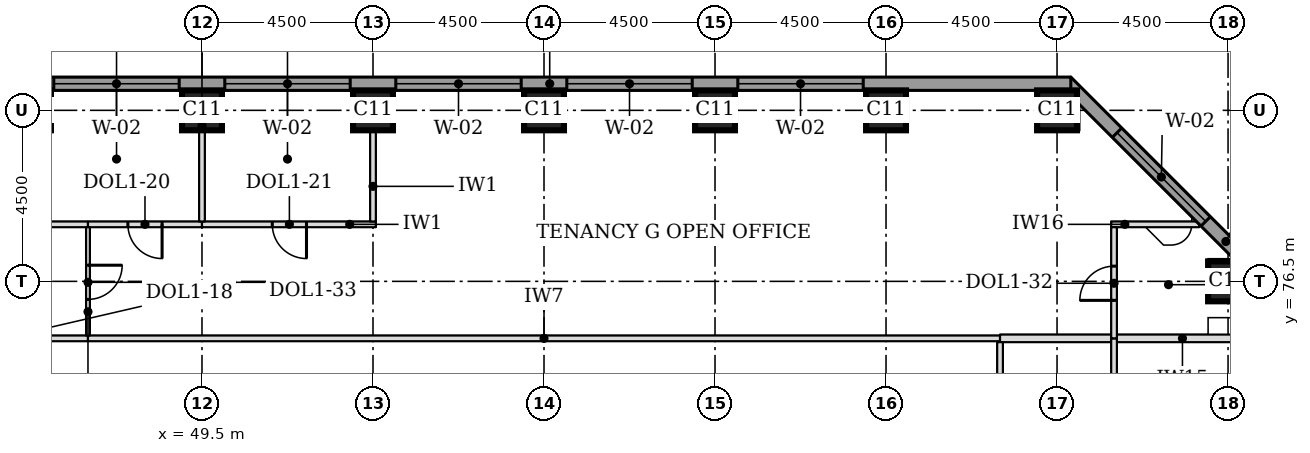
"""IFC4 building model, lengths in metres.
Left out: names, types, materials, properties, quantities, classifications, styles, units other than length and angle.
Written with IfcOpenShell. Run it as: python <this file> out.ifc"""

import sys

from ifc_helpers import new_model, si_unit, direction, frame, frame_2d, origin, origin_2d, place, context, subcontext, project, spatial, rectangle, extrude, element, fill, save


model = new_model("IFC4")
c1 = context("Model", 3, precision=1e-05, world=origin(), true_north=direction((0.0, 1.0)))
c2 = subcontext(c1, "Body", "Model", "MODEL_VIEW")
j1 = project(units=[si_unit("LENGTHUNIT", "METRE"), si_unit("PLANEANGLEUNIT", "RADIAN")], contexts=[c1])
p1 = place(None, origin())
s1 = spatial("IfcSite", under=j1, at=p1, CompositionType="ELEMENT")
p2 = place(p1, origin())
s2 = spatial("IfcBuilding", under=s1, at=p2, CompositionType="ELEMENT")
p3 = place(p2, frame((0.0, 0.0, 82.6)))
s3 = spatial("IfcBuildingStorey", under=s2, at=p3, CompositionType="ELEMENT", Elevation=82.6)
for number, where, z_axis, x_axis in (
    (1, (76.5, 76.5, 0.0), (0.0, 0.0, 1.0), (1.0, 0.0, 0.0)),
    (2, (49.5, 81.0, 0.0), (0.0, 0.0, 1.0), (1.0, 0.0, 0.0)),
    (3, (54.0, 81.0, 0.0), (0.0, 0.0, 1.0), (1.0, 0.0, 0.0)),
    (4, (58.5, 81.0, 0.0), (0.0, 0.0, 1.0), (1.0, 0.0, 0.0)),
    (5, (63.0, 81.0, 0.0), (0.0, 0.0, 1.0), (1.0, 0.0, 0.0)),
    (6, (67.5, 81.0, 0.0), (0.0, 0.0, 1.0), (1.0, 0.0, 0.0)),
    (7, (72.0, 81.0, 0.0), (0.0, 0.0, 1.0), (1.0, 0.0, 0.0)),
):
    element("IfcColumn", number, at=place(p3, frame(where, z_axis=z_axis, x_axis=x_axis)), inside=s3, PredefinedType="COLUMN", context=c2, shape_type="SweptSolid", body=[
        extrude(rectangle(XDim=1.05, YDim=1.05, at=origin_2d()), origin(), (0.0, 0.0, 1.0), 3.7),
    ])
p4 = place(p3, frame((77.251, 76.739, 0.0), z_axis=(0.0, 0.0, 1.0), x_axis=(-0.707106781187, 0.707106781187, 0.0)))
e8 = element("IfcWall", 8, at=p4, inside=s3, PredefinedType="STANDARD", context=c2, shape_type="SweptSolid", body=[
    extrude(rectangle(XDim=7.089, YDim=0.35, at=frame_2d((3.544, 0.0))), origin(), (0.0, 0.0, 1.0), 3.525),
])
p5 = place(p4, frame((1.894, 0.0, 0.9)))
e9 = element("IfcOpeningElement", 9, at=p5, cuts=e8, PredefinedType="OPENING", context=c2, shape_type="SweptSolid", body=[
    extrude(rectangle(XDim=3.3, YDim=1.9, at=frame_2d((1.65, 0.95))), frame((0.0, 0.185, 0.0), z_axis=(0.0, -1.0, 0.0), x_axis=(1.0, 0.0, 0.0)), (0.0, 0.0, 1.0), 0.37),
])
p6 = place(p3, frame((72.362, 81.7, 0.0), z_axis=(0.0, 0.0, 1.0), x_axis=(-1.0, 0.0, 0.0)))
e10 = element("IfcWall", 10, at=p6, inside=s3, PredefinedType="STANDARD", context=c2, shape_type="SweptSolid", body=[
    extrude(rectangle(XDim=32.225, YDim=0.35, at=frame_2d((16.112, 0.0))), origin(), (0.0, 0.0, 1.0), 3.525),
])
p7 = place(p6, frame((5.462, 0.0, 0.9)))
e11 = element("IfcOpeningElement", 11, at=p7, cuts=e10, PredefinedType="OPENING", context=c2, shape_type="SweptSolid", body=[
    extrude(rectangle(XDim=3.3, YDim=1.9, at=frame_2d((1.65, 0.95))), frame((0.0, 0.185, 0.0), z_axis=(0.0, -1.0, 0.0), x_axis=(1.0, 0.0, 0.0)), (0.0, 0.0, 1.0), 0.37),
])
p8 = place(p6, frame((9.962, 0.0, 0.9)))
e12 = element("IfcOpeningElement", 12, at=p8, cuts=e10, PredefinedType="OPENING", context=c2, shape_type="SweptSolid", body=[
    extrude(rectangle(XDim=3.3, YDim=1.9, at=frame_2d((1.65, 0.95))), frame((0.0, 0.185, 0.0), z_axis=(0.0, -1.0, 0.0), x_axis=(1.0, 0.0, 0.0)), (0.0, 0.0, 1.0), 0.37),
])
p9 = place(p6, frame((14.462, 0.0, 0.9)))
e13 = element("IfcOpeningElement", 13, at=p9, cuts=e10, PredefinedType="OPENING", context=c2, shape_type="SweptSolid", body=[
    extrude(rectangle(XDim=3.3, YDim=1.9, at=frame_2d((1.65, 0.95))), frame((0.0, 0.185, 0.0), z_axis=(0.0, -1.0, 0.0), x_axis=(1.0, 0.0, 0.0)), (0.0, 0.0, 1.0), 0.37),
])
p10 = place(p6, frame((18.962, 0.0, 0.9)))
e14 = element("IfcOpeningElement", 14, at=p10, cuts=e10, PredefinedType="OPENING", context=c2, shape_type="SweptSolid", body=[
    extrude(rectangle(XDim=3.3, YDim=1.9, at=frame_2d((1.65, 0.95))), frame((0.0, 0.185, 0.0), z_axis=(0.0, -1.0, 0.0), x_axis=(1.0, 0.0, 0.0)), (0.0, 0.0, 1.0), 0.37),
])
p11 = place(p6, frame((23.462, 0.0, 0.9)))
e15 = element("IfcOpeningElement", 15, at=p11, cuts=e10, PredefinedType="OPENING", context=c2, shape_type="SweptSolid", body=[
    extrude(rectangle(XDim=3.3, YDim=1.9, at=frame_2d((1.65, 0.95))), frame((0.0, 0.185, 0.0), z_axis=(0.0, -1.0, 0.0), x_axis=(1.0, 0.0, 0.0)), (0.0, 0.0, 1.0), 0.37),
])
p12 = place(p3, frame((42.0, 75.0, 0.0), z_axis=(0.0, 0.0, 1.0), x_axis=(1.0, 0.0, 0.0)))
e16 = element("IfcWall", 16, at=p12, inside=s3, PredefinedType="PARTITIONING", context=c2, shape_type="SweptSolid", body=[
    extrude(rectangle(XDim=4.5, YDim=0.15, at=frame_2d((2.25, 0.0))), origin(), (0.0, 0.0, 1.0), 3.55),
])
p13 = place(p12, frame((1.75, 0.0, 0.0)))
e17 = element("IfcOpeningElement", 17, at=p13, cuts=e16, PredefinedType="OPENING", context=c2, shape_type="SweptSolid", body=[
    extrude(rectangle(XDim=1.0, YDim=2.1, at=frame_2d((0.5, 1.05))), frame((0.0, 0.085, 0.0), z_axis=(0.0, -1.0, 0.0), x_axis=(1.0, 0.0, 0.0)), (0.0, 0.0, 1.0), 0.17),
])
p14 = place(p3, frame((46.5, 75.0, 0.0), z_axis=(0.0, 0.0, 1.0), x_axis=(1.0, 0.0, 0.0)))
e18 = element("IfcWall", 18, at=p14, inside=s3, PredefinedType="PARTITIONING", context=c2, shape_type="SweptSolid", body=[
    extrude(rectangle(XDim=24.0, YDim=0.15, at=frame_2d((12.0, 0.0))), origin(), (0.0, 0.0, 1.0), 3.55),
])
p15 = place(p3, frame((70.5, 75.0, 0.0), z_axis=(0.0, 0.0, 1.0), x_axis=(1.0, 0.0, 0.0)))
e19 = element("IfcWall", 19, at=p15, inside=s3, PredefinedType="PARTITIONING", context=c2, shape_type="SweptSolid", body=[
    extrude(rectangle(XDim=2.925, YDim=0.2, at=frame_2d((1.462, 0.0))), origin(), (0.0, 0.0, 1.0), 3.55),
])
p16 = place(p3, frame((73.575, 75.0, 0.0), z_axis=(0.0, 0.0, 1.0), x_axis=(1.0, 0.0, 0.0)))
e20 = element("IfcWall", 20, at=p16, inside=s3, PredefinedType="PARTITIONING", context=c2, shape_type="SweptSolid", body=[
    extrude(rectangle(XDim=3.45, YDim=0.2, at=frame_2d((1.725, 0.0))), origin(), (0.0, 0.0, 1.0), 3.55),
])
p17 = place(p3, frame((45.0, 78.0, 0.0), z_axis=(0.0, 0.0, 1.0), x_axis=(1.0, 0.0, 0.0)))
e21 = element("IfcWall", 21, at=p17, inside=s3, PredefinedType="PARTITIONING", context=c2, shape_type="SweptSolid", body=[
    extrude(rectangle(XDim=1.5, YDim=0.15, at=frame_2d((0.75, 0.0))), origin(), (0.0, 0.0, 1.0), 3.55),
])
p18 = place(p3, frame((46.5, 78.0, 0.0), z_axis=(0.0, 0.0, 1.0), x_axis=(1.0, 0.0, 0.0)))
e22 = element("IfcWall", 22, at=p18, inside=s3, PredefinedType="PARTITIONING", context=c2, shape_type="SweptSolid", body=[
    extrude(rectangle(XDim=3.0, YDim=0.15, at=frame_2d((1.5, 0.0))), origin(), (0.0, 0.0, 1.0), 3.55),
])
p19 = place(p18, frame((1.05, 0.0, 0.0)))
e23 = element("IfcOpeningElement", 23, at=p19, cuts=e22, PredefinedType="OPENING", context=c2, shape_type="SweptSolid", body=[
    extrude(rectangle(XDim=0.9, YDim=2.1, at=frame_2d((0.45, 1.05))), frame((0.0, 0.085, 0.0), z_axis=(0.0, -1.0, 0.0), x_axis=(1.0, 0.0, 0.0)), (0.0, 0.0, 1.0), 0.17),
])
p20 = place(p3, frame((49.5, 78.0, 0.0), z_axis=(0.0, 0.0, 1.0), x_axis=(1.0, 0.0, 0.0)))
e24 = element("IfcWall", 24, at=p20, inside=s3, PredefinedType="PARTITIONING", context=c2, shape_type="SweptSolid", body=[
    extrude(rectangle(XDim=4.575, YDim=0.15, at=frame_2d((2.288, 0.0))), origin(), (0.0, 0.0, 1.0), 3.55),
])
p21 = place(p20, frame((1.85, 0.0, 0.0)))
e25 = element("IfcOpeningElement", 25, at=p21, cuts=e24, PredefinedType="OPENING", context=c2, shape_type="SweptSolid", body=[
    extrude(rectangle(XDim=0.9, YDim=2.1, at=frame_2d((0.45, 1.05))), frame((0.0, 0.085, 0.0), z_axis=(0.0, -1.0, 0.0), x_axis=(1.0, 0.0, 0.0)), (0.0, 0.0, 1.0), 0.17),
])
p22 = place(p3, frame((73.425, 78.0, 0.0), z_axis=(0.0, 0.0, 1.0), x_axis=(1.0, 0.0, 0.0)))
e26 = element("IfcWall", 26, at=p22, inside=s3, PredefinedType="PARTITIONING", context=c2, shape_type="SweptSolid", body=[
    extrude(rectangle(XDim=2.317, YDim=0.15, at=frame_2d((1.159, 0.0))), origin(), (0.0, 0.0, 1.0), 3.55),
])
p23 = place(p3, frame((70.5, 72.0, 0.0), z_axis=(0.0, 0.0, 1.0), x_axis=(0.0, 1.0, 0.0)))
e27 = element("IfcWall", 27, at=p23, inside=s3, PredefinedType="PARTITIONING", context=c2, shape_type="SweptSolid", body=[
    extrude(rectangle(XDim=2.9, YDim=0.15, at=frame_2d((1.45, 0.0))), origin(), (0.0, 0.0, 1.0), 3.55),
])
p24 = place(p3, frame((73.5, 72.075, 0.0), z_axis=(0.0, 0.0, 1.0), x_axis=(0.0, 1.0, 0.0)))
e28 = element("IfcWall", 28, at=p24, inside=s3, PredefinedType="PARTITIONING", context=c2, shape_type="SweptSolid", body=[
    extrude(rectangle(XDim=2.925, YDim=0.15, at=frame_2d((1.462, 0.0))), origin(), (0.0, 0.0, 1.0), 3.55),
])
p25 = place(p3, frame((73.5, 75.0, 0.0), z_axis=(0.0, 0.0, 1.0), x_axis=(0.0, 1.0, 0.0)))
e29 = element("IfcWall", 29, at=p25, inside=s3, PredefinedType="PARTITIONING", context=c2, shape_type="SweptSolid", body=[
    extrude(rectangle(XDim=2.925, YDim=0.15, at=frame_2d((1.462, 0.0))), origin(), (0.0, 0.0, 1.0), 3.55),
])
p26 = place(p25, frame((1.0, 0.0, 0.0)))
e30 = element("IfcOpeningElement", 30, at=p26, cuts=e29, PredefinedType="OPENING", context=c2, shape_type="SweptSolid", body=[
    extrude(rectangle(XDim=0.9, YDim=2.1, at=frame_2d((0.45, 1.05))), frame((0.0, 0.085, 0.0), z_axis=(0.0, -1.0, 0.0), x_axis=(1.0, 0.0, 0.0)), (0.0, 0.0, 1.0), 0.17),
])
p27 = place(p3, frame((46.5, 75.075, 0.0), z_axis=(0.0, 0.0, 1.0), x_axis=(0.0, 1.0, 0.0)))
e31 = element("IfcWall", 31, at=p27, inside=s3, PredefinedType="PARTITIONING", context=c2, shape_type="SweptSolid", body=[
    extrude(rectangle(XDim=2.85, YDim=0.1, at=frame_2d((1.425, 0.0))), origin(), (0.0, 0.0, 1.0), 3.022),
])
p28 = place(p27, frame((0.95, 0.0, 0.0)))
e32 = element("IfcOpeningElement", 32, at=p28, cuts=e31, PredefinedType="OPENING", context=c2, shape_type="SweptSolid", body=[
    extrude(rectangle(XDim=0.9, YDim=2.1, at=frame_2d((0.45, 1.05))), frame((0.0, 0.06, 0.0), z_axis=(0.0, -1.0, 0.0), x_axis=(1.0, 0.0, 0.0)), (0.0, 0.0, 1.0), 0.12),
])
for number, where, z_axis, x_axis in (
    (33, (49.5, 78.075, 0.0), (0.0, 0.0, 1.0), (0.0, 1.0, 0.0)),
    (34, (54.0, 78.075, 0.0), (0.0, 0.0, 1.0), (0.0, 1.0, 0.0)),
):
    element("IfcWall", number, at=place(p3, frame(where, z_axis=z_axis, x_axis=x_axis)), inside=s3, PredefinedType="PARTITIONING", context=c2, shape_type="SweptSolid", body=[
        extrude(rectangle(XDim=3.45, YDim=0.15, at=frame_2d((1.725, 0.0))), origin(), (0.0, 0.0, 1.0), 3.55),
    ])
p29 = place(p5, origin())
e35 = element("IfcWindow", 35, at=p29, inside=s3, PartitioningType="SINGLE_PANEL", PredefinedType="WINDOW", context=c2, shape_type="SweptSolid", body=[
    extrude(rectangle(XDim=3.3, YDim=1.9, at=frame_2d((1.65, 0.95))), frame((0.0, 0.085, 0.0), z_axis=(0.0, -1.0, 0.0), x_axis=(1.0, 0.0, 0.0)), (0.0, 0.0, 1.0), 0.06),
])
fill(e9, e35)
p30 = place(p7, origin())
e36 = element("IfcWindow", 36, at=p30, inside=s3, PartitioningType="SINGLE_PANEL", PredefinedType="WINDOW", context=c2, shape_type="SweptSolid", body=[
    extrude(rectangle(XDim=3.3, YDim=1.9, at=frame_2d((1.65, 0.95))), frame((0.0, 0.085, 0.0), z_axis=(0.0, -1.0, 0.0), x_axis=(1.0, 0.0, 0.0)), (0.0, 0.0, 1.0), 0.06),
])
fill(e11, e36)
p31 = place(p8, origin())
e37 = element("IfcWindow", 37, at=p31, inside=s3, PartitioningType="SINGLE_PANEL", PredefinedType="WINDOW", context=c2, shape_type="SweptSolid", body=[
    extrude(rectangle(XDim=3.3, YDim=1.9, at=frame_2d((1.65, 0.95))), frame((0.0, 0.085, 0.0), z_axis=(0.0, -1.0, 0.0), x_axis=(1.0, 0.0, 0.0)), (0.0, 0.0, 1.0), 0.06),
])
fill(e12, e37)
p32 = place(p9, origin())
e38 = element("IfcWindow", 38, at=p32, inside=s3, PartitioningType="SINGLE_PANEL", PredefinedType="WINDOW", context=c2, shape_type="SweptSolid", body=[
    extrude(rectangle(XDim=3.3, YDim=1.9, at=frame_2d((1.65, 0.95))), frame((0.0, 0.085, 0.0), z_axis=(0.0, -1.0, 0.0), x_axis=(1.0, 0.0, 0.0)), (0.0, 0.0, 1.0), 0.06),
])
fill(e13, e38)
p33 = place(p10, origin())
e39 = element("IfcWindow", 39, at=p33, inside=s3, PartitioningType="SINGLE_PANEL", PredefinedType="WINDOW", context=c2, shape_type="SweptSolid", body=[
    extrude(rectangle(XDim=3.3, YDim=1.9, at=frame_2d((1.65, 0.95))), frame((0.0, 0.085, 0.0), z_axis=(0.0, -1.0, 0.0), x_axis=(1.0, 0.0, 0.0)), (0.0, 0.0, 1.0), 0.06),
])
fill(e14, e39)
p34 = place(p11, origin())
e40 = element("IfcWindow", 40, at=p34, inside=s3, PartitioningType="SINGLE_PANEL", PredefinedType="WINDOW", context=c2, shape_type="SweptSolid", body=[
    extrude(rectangle(XDim=3.3, YDim=1.9, at=frame_2d((1.65, 0.95))), frame((0.0, 0.085, 0.0), z_axis=(0.0, -1.0, 0.0), x_axis=(1.0, 0.0, 0.0)), (0.0, 0.0, 1.0), 0.06),
])
fill(e15, e40)
p35 = place(p28, frame((0.9, 0.0, 0.0), z_axis=(0.0, 0.0, 1.0), x_axis=(-1.0, 0.0, 0.0)))
e41 = element("IfcDoor", 41, at=p35, inside=s3, OperationType="SINGLE_SWING_LEFT", PredefinedType="DOOR", context=c2, shape_type="SweptSolid", body=[
    extrude(rectangle(XDim=0.9, YDim=2.1, at=frame_2d((0.45, 1.05))), frame((0.0, 0.025, 0.0), z_axis=(0.0, -1.0, 0.0), x_axis=(1.0, 0.0, 0.0)), (0.0, 0.0, 1.0), 0.05),
])
fill(e32, e41)
p36 = place(p26, origin())
e42 = element("IfcDoor", 42, at=p36, inside=s3, OperationType="SINGLE_SWING_LEFT", PredefinedType="DOOR", context=c2, shape_type="SweptSolid", body=[
    extrude(rectangle(XDim=0.9, YDim=2.1, at=frame_2d((0.45, 1.05))), frame((0.0, 0.025, 0.0), z_axis=(0.0, -1.0, 0.0), x_axis=(1.0, 0.0, 0.0)), (0.0, 0.0, 1.0), 0.05),
])
fill(e30, e42)
p37 = place(p19, frame((0.9, 0.0, 0.0), z_axis=(0.0, 0.0, 1.0), x_axis=(-1.0, 0.0, 0.0)))
e43 = element("IfcDoor", 43, at=p37, inside=s3, OperationType="SINGLE_SWING_LEFT", PredefinedType="DOOR", context=c2, shape_type="SweptSolid", body=[
    extrude(rectangle(XDim=0.9, YDim=2.1, at=frame_2d((0.45, 1.05))), frame((0.0, 0.025, 0.0), z_axis=(0.0, -1.0, 0.0), x_axis=(1.0, 0.0, 0.0)), (0.0, 0.0, 1.0), 0.05),
])
fill(e23, e43)
p38 = place(p21, frame((0.9, 0.0, 0.0), z_axis=(0.0, 0.0, 1.0), x_axis=(-1.0, 0.0, 0.0)))
e44 = element("IfcDoor", 44, at=p38, inside=s3, OperationType="SINGLE_SWING_LEFT", PredefinedType="DOOR", context=c2, shape_type="SweptSolid", body=[
    extrude(rectangle(XDim=0.9, YDim=2.1, at=frame_2d((0.45, 1.05))), frame((0.0, 0.025, 0.0), z_axis=(0.0, -1.0, 0.0), x_axis=(1.0, 0.0, 0.0)), (0.0, 0.0, 1.0), 0.05),
])
fill(e25, e44)
save(model, sys.argv[1])
